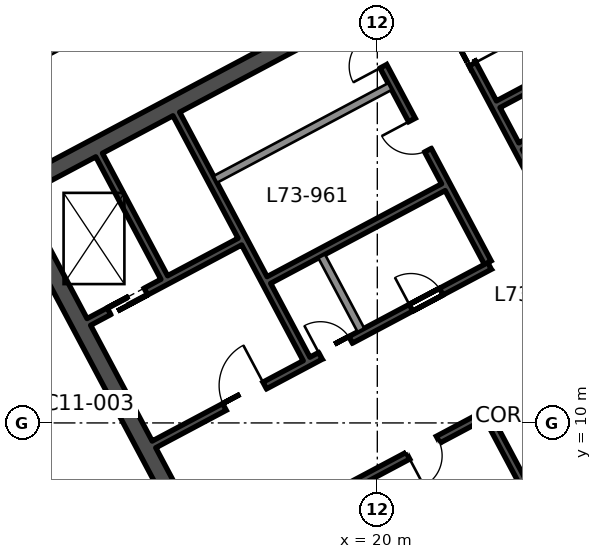
"""IFC4 building model, lengths in metres.
Left out: names, types, materials, properties, quantities, classifications, styles, units other than length and angle.
Written with IfcOpenShell. Run it as: python <this file> out.ifc"""

import sys

from ifc_helpers import new_model, si_unit, direction, frame, frame_2d, origin, place, context, subcontext, project, spatial, rectangle, extrude, element, fill, save


model = new_model("IFC4")
c1 = context("Model", 3, precision=1e-05, world=origin(), true_north=direction((0.0, 1.0)))
c2 = subcontext(c1, "Body", "Model", "MODEL_VIEW")
j1 = project(units=[si_unit("LENGTHUNIT", "METRE"), si_unit("PLANEANGLEUNIT", "RADIAN")], contexts=[c1])
p1 = place(None, origin())
s1 = spatial("IfcSite", under=j1, at=p1, CompositionType="ELEMENT")
p2 = place(p1, origin())
s2 = spatial("IfcBuilding", under=s1, at=p2, CompositionType="ELEMENT")
p3 = place(p2, frame((0.0, 0.0, 320.4)))
s3 = spatial("IfcBuildingStorey", under=s2, at=p3, CompositionType="ELEMENT", Elevation=320.4)
p4 = place(p3, frame((19.207, -0.604, 0.0), z_axis=(0.0, 0.0, 1.0), x_axis=(-0.469467968382, 0.882949504028, 0.0)))
e1 = element("IfcWall", 1, at=p4, inside=s3, PredefinedType="SHEAR", context=c2, shape_type="SweptSolid", body=[
    extrude(rectangle(XDim=19.1, YDim=0.45, at=frame_2d((9.55, 0.0))), origin(), (0.0, 0.0, 1.0), 3.9),
])
p5 = place(p4, frame((6.55, 0.0, 0.0)))
e2 = element("IfcOpeningElement", 2, at=p5, cuts=e1, PredefinedType="OPENING", context=c2, shape_type="SweptSolid", body=[
    extrude(rectangle(XDim=2.4, YDim=2.4, at=frame_2d((1.2, 1.2))), frame((0.0, 0.235, 0.0), z_axis=(0.0, -1.0, 0.0), x_axis=(1.0, 0.0, 0.0)), (0.0, 0.0, 1.0), 0.47),
])
p6 = place(p3, frame((19.3, -0.299, 0.0), z_axis=(0.0, 0.0, 1.0), x_axis=(0.88295276571, 0.46946183394, 0.0)))
e3 = element("IfcWall", 3, at=p6, inside=s3, PredefinedType="SHEAR", context=c2, shape_type="SweptSolid", body=[
    extrude(rectangle(XDim=20.2, YDim=0.45, at=frame_2d((10.1, 0.0))), origin(), (0.0, 0.0, 1.0), 3.9),
])
p7 = place(p3, frame((10.544, 16.167, 0.0), z_axis=(0.0, 0.0, 1.0), x_axis=(0.882947755831, 0.46947125628, 0.0)))
e4 = element("IfcWall", 4, at=p7, inside=s3, PredefinedType="SHEAR", context=c2, shape_type="SweptSolid", body=[
    extrude(rectangle(XDim=20.2, YDim=0.45, at=frame_2d((10.1, 0.0))), origin(), (0.0, 0.0, 1.0), 3.9),
])
p8 = place(p3, frame((14.394, 13.826, 0.0), z_axis=(0.0, 0.0, 1.0), x_axis=(-0.469494272526, 0.882935517501, 0.0)))
e5 = element("IfcWall", 5, at=p8, inside=s3, PredefinedType="SHEAR", context=c2, shape_type="SweptSolid", body=[
    extrude(rectangle(XDim=3.65, YDim=0.2, at=frame_2d((1.825, 0.0))), origin(), (0.0, 0.0, 1.0), 3.9),
])
p9 = place(p3, frame((18.138, 11.683, 0.0), z_axis=(0.0, 0.0, 1.0), x_axis=(-0.469480409012, 0.88294288918, 0.0)))
e6 = element("IfcWall", 6, at=p9, inside=s3, PredefinedType="SHEAR", context=c2, shape_type="SweptSolid", body=[
    extrude(rectangle(XDim=7.3, YDim=0.2, at=frame_2d((3.65, 0.0))), origin(), (0.0, 0.0, 1.0), 3.9),
])
p10 = place(p3, frame((19.569, 12.444, 0.0), z_axis=(0.0, 0.0, 1.0), x_axis=(-0.4694473164, 0.882960484464, 0.0)))
e7 = element("IfcWall", 7, at=p10, inside=s3, PredefinedType="SOLIDWALL", context=c2, shape_type="SweptSolid", body=[
    extrude(rectangle(XDim=2.2, YDim=0.2, at=frame_2d((1.1, 0.0))), origin(), (0.0, 0.0, 1.0), 3.9),
])
p11 = place(p3, frame((26.346, 3.702, 0.0), z_axis=(0.0, 0.0, 1.0), x_axis=(-0.469480409012, 0.88294288918, 0.0)))
e8 = element("IfcWall", 8, at=p11, inside=s3, PredefinedType="SHEAR", context=c2, shape_type="SweptSolid", body=[
    extrude(rectangle(XDim=7.3, YDim=0.2, at=frame_2d((3.65, 0.0))), origin(), (0.0, 0.0, 1.0), 3.9),
])
p12 = place(p11, frame((1.3, 0.0, 0.0)))
e9 = element("IfcOpeningElement", 9, at=p12, cuts=e8, PredefinedType="OPENING", context=c2, shape_type="SweptSolid", body=[
    extrude(rectangle(XDim=1.2, YDim=2.1, at=frame_2d((0.6, 1.05))), frame((0.0, 0.11, 0.0), z_axis=(0.0, -1.0, 0.0), x_axis=(1.0, 0.0, 0.0)), (0.0, 0.0, 1.0), 0.22),
])
p13 = place(p3, frame((22.906, 14.218, 0.0), z_axis=(0.0, 0.0, 1.0), x_axis=(-0.469480409012, 0.88294288918, 0.0)))
e10 = element("IfcWall", 10, at=p13, inside=s3, PredefinedType="SHEAR", context=c2, shape_type="SweptSolid", body=[
    extrude(rectangle(XDim=7.3, YDim=0.2, at=frame_2d((3.65, 0.0))), origin(), (0.0, 0.0, 1.0), 3.9),
])
p14 = place(p13, frame((3.35, 0.0, 0.0)))
e11 = element("IfcOpeningElement", 11, at=p14, cuts=e10, PredefinedType="OPENING", context=c2, shape_type="SweptSolid", body=[
    extrude(rectangle(XDim=0.9, YDim=2.1, at=frame_2d((0.45, 1.05))), frame((0.0, 0.11, 0.0), z_axis=(0.0, -1.0, 0.0), x_axis=(1.0, 0.0, 0.0)), (0.0, 0.0, 1.0), 0.22),
])
p15 = place(p13, frame((5.85, 0.0, 0.0)))
e12 = element("IfcOpeningElement", 12, at=p15, cuts=e10, PredefinedType="OPENING", context=c2, shape_type="SweptSolid", body=[
    extrude(rectangle(XDim=0.9, YDim=2.1, at=frame_2d((0.45, 1.05))), frame((0.0, 0.11, 0.0), z_axis=(0.0, -1.0, 0.0), x_axis=(1.0, 0.0, 0.0)), (0.0, 0.0, 1.0), 0.22),
])
p16 = place(p3, frame((24.76, 15.204, 0.0), z_axis=(0.0, 0.0, 1.0), x_axis=(-0.469494272526, 0.882935517501, 0.0)))
e13 = element("IfcWall", 13, at=p16, inside=s3, PredefinedType="SHEAR", context=c2, shape_type="SweptSolid", body=[
    extrude(rectangle(XDim=7.3, YDim=0.2, at=frame_2d((3.65, 0.0))), origin(), (0.0, 0.0, 1.0), 3.9),
])
p17 = place(p16, frame((4.8, 0.0, 0.0)))
e14 = element("IfcOpeningElement", 14, at=p17, cuts=e13, PredefinedType="OPENING", context=c2, shape_type="SweptSolid", body=[
    extrude(rectangle(XDim=1.2, YDim=2.1, at=frame_2d((0.6, 1.05))), frame((0.0, 0.11, 0.0), z_axis=(0.0, -1.0, 0.0), x_axis=(1.0, 0.0, 0.0)), (0.0, 0.0, 1.0), 0.22),
])
p18 = place(p3, frame((18.104, 7.701, 0.0), z_axis=(0.0, 0.0, 1.0), x_axis=(0.882952937579, 0.469461510692, 0.0)))
e15 = element("IfcWall", 15, at=p18, inside=s3, PredefinedType="SHEAR", context=c2, shape_type="SweptSolid", body=[
    extrude(rectangle(XDim=5.4, YDim=0.2, at=frame_2d((2.7, 0.0))), origin(), (0.0, 0.0, 1.0), 3.9),
])
p19 = place(p18, frame((0.36, 0.0, 0.0)))
e16 = element("IfcOpeningElement", 16, at=p19, cuts=e15, PredefinedType="OPENING", context=c2, shape_type="SweptSolid", body=[
    extrude(rectangle(XDim=0.9, YDim=2.1, at=frame_2d((0.45, 1.05))), frame((0.0, 0.11, 0.0), z_axis=(0.0, -1.0, 0.0), x_axis=(1.0, 0.0, 0.0)), (0.0, 0.0, 1.0), 0.22),
])
p20 = place(p18, frame((3.06, 0.0, 0.0)))
e17 = element("IfcOpeningElement", 17, at=p20, cuts=e15, PredefinedType="OPENING", context=c2, shape_type="SweptSolid", body=[
    extrude(rectangle(XDim=0.9, YDim=2.1, at=frame_2d((0.45, 1.05))), frame((0.0, 0.11, 0.0), z_axis=(0.0, -1.0, 0.0), x_axis=(1.0, 0.0, 0.0)), (0.0, 0.0, 1.0), 0.22),
])
p21 = place(p3, frame((14.124, 9.435, 0.0), z_axis=(0.0, 0.0, 1.0), x_axis=(0.882940221191, 0.469485426614, 0.0)))
e18 = element("IfcWall", 18, at=p21, inside=s3, PredefinedType="SHEAR", context=c2, shape_type="SweptSolid", body=[
    extrude(rectangle(XDim=10.0, YDim=0.2, at=frame_2d((5.0, 0.0))), origin(), (0.0, 0.0, 1.0), 3.9),
])
p22 = place(p21, frame((2.1, 0.0, 0.0)))
e19 = element("IfcOpeningElement", 19, at=p22, cuts=e18, PredefinedType="OPENING", context=c2, shape_type="SweptSolid", body=[
    extrude(rectangle(XDim=1.2, YDim=2.1, at=frame_2d((0.6, 1.05))), frame((0.0, 0.11, 0.0), z_axis=(0.0, -1.0, 0.0), x_axis=(1.0, 0.0, 0.0)), (0.0, 0.0, 1.0), 0.22),
])
p23 = place(p21, frame((4.96, 0.0, 0.0)))
e20 = element("IfcOpeningElement", 20, at=p23, cuts=e18, PredefinedType="OPENING", context=c2, shape_type="SweptSolid", body=[
    extrude(rectangle(XDim=0.9, YDim=2.1, at=frame_2d((0.45, 1.05))), frame((0.0, 0.11, 0.0), z_axis=(0.0, -1.0, 0.0), x_axis=(1.0, 0.0, 0.0)), (0.0, 0.0, 1.0), 0.22),
])
p24 = place(p21, frame((7.66, 0.0, 0.0)))
e21 = element("IfcOpeningElement", 21, at=p24, cuts=e18, PredefinedType="OPENING", context=c2, shape_type="SweptSolid", body=[
    extrude(rectangle(XDim=0.9, YDim=2.1, at=frame_2d((0.45, 1.05))), frame((0.0, 0.11, 0.0), z_axis=(0.0, -1.0, 0.0), x_axis=(1.0, 0.0, 0.0)), (0.0, 0.0, 1.0), 0.22),
])
p25 = place(p3, frame((17.147, 13.761, 0.0), z_axis=(0.0, 0.0, 1.0), x_axis=(0.882964314875, 0.469440111896, 0.0)))
e22 = element("IfcWall", 22, at=p25, inside=s3, PredefinedType="SHEAR", context=c2, shape_type="SweptSolid", body=[
    extrude(rectangle(XDim=5.2, YDim=0.2, at=frame_2d((2.6, 0.0))), origin(), (0.0, 0.0, 1.0), 3.9),
])
p26 = place(p3, frame((23.769, 17.282, 0.0), z_axis=(0.0, 0.0, 1.0), x_axis=(0.882940221191, 0.469485426614, 0.0)))
e23 = element("IfcWall", 23, at=p26, inside=s3, PredefinedType="SHEAR", context=c2, shape_type="SweptSolid", body=[
    extrude(rectangle(XDim=8.0, YDim=0.2, at=frame_2d((4.0, 0.0))), origin(), (0.0, 0.0, 1.0), 3.9),
])
p27 = place(p3, frame((12.41, 12.658, 0.0), z_axis=(0.0, 0.0, 1.0), x_axis=(0.8829484765, 0.469469900894, 0.0)))
e24 = element("IfcWall", 24, at=p27, inside=s3, PredefinedType="SHEAR", context=c2, shape_type="SweptSolid", body=[
    extrude(rectangle(XDim=4.5, YDim=0.2, at=frame_2d((2.25, 0.0))), origin(), (0.0, 0.0, 1.0), 3.9),
])
p28 = place(p27, frame((0.6, 0.0, 0.0)))
e25 = element("IfcOpeningElement", 25, at=p28, cuts=e24, PredefinedType="OPENING", context=c2, shape_type="SweptSolid", body=[
    extrude(rectangle(XDim=1.1, YDim=2.1, at=frame_2d((0.55, 1.05))), frame((0.0, 0.11, 0.0), z_axis=(0.0, -1.0, 0.0), x_axis=(1.0, 0.0, 0.0)), (0.0, 0.0, 1.0), 0.22),
])
p29 = place(p3, frame((23.182, 18.385, 0.0), z_axis=(0.0, 0.0, 1.0), x_axis=(0.88295287151, 0.469461634952, 0.0)))
e26 = element("IfcWall", 26, at=p29, inside=s3, PredefinedType="SHEAR", context=c2, shape_type="SweptSolid", body=[
    extrude(rectangle(XDim=8.0, YDim=0.2, at=frame_2d((4.0, 0.0))), origin(), (0.0, 0.0, 1.0), 3.9),
])
p30 = place(p3, frame((15.739, 16.409, 0.0), z_axis=(0.0, 0.0, 1.0), x_axis=(0.882934506056, 0.469496174655, 0.0)))
e27 = element("IfcWall", 27, at=p30, inside=s3, PredefinedType="SOLIDWALL", context=c2, shape_type="SweptSolid", body=[
    extrude(rectangle(XDim=5.2, YDim=0.2, at=frame_2d((2.6, 0.0))), origin(), (0.0, 0.0, 1.0), 3.9),
])
p31 = place(p3, frame((0.0, 13.704, 0.0), z_axis=(0.0, 0.0, 1.0), x_axis=(0.882954463269, 0.469458641196, 0.0)))
e28 = element("IfcWall", 28, at=p31, inside=s3, PredefinedType="PARTITIONING", context=c2, shape_type="SweptSolid", body=[
    extrude(rectangle(XDim=33.766, YDim=0.15, at=frame_2d((16.883, 0.0))), origin(), (0.0, 0.0, 1.0), 3.54),
])
p32 = place(p31, frame((15.95, 0.0, 0.0)))
e29 = element("IfcOpeningElement", 29, at=p32, cuts=e28, PredefinedType="OPENING", context=c2, shape_type="SweptSolid", body=[
    extrude(rectangle(XDim=1.8, YDim=2.1, at=frame_2d((0.9, 1.05))), frame((0.0, 0.085, 0.0), z_axis=(0.0, -1.0, 0.0), x_axis=(1.0, 0.0, 0.0)), (0.0, 0.0, 1.0), 0.17),
])
p33 = place(p22, origin())
e30 = element("IfcDoor", 30, at=p33, inside=s3, OperationType="SINGLE_SWING_RIGHT", PredefinedType="DOOR", context=c2, shape_type="SweptSolid", body=[
    extrude(rectangle(XDim=1.2, YDim=2.1, at=frame_2d((0.6, 1.05))), frame((0.0, 0.025, 0.0), z_axis=(0.0, -1.0, 0.0), x_axis=(1.0, 0.0, 0.0)), (0.0, 0.0, 1.0), 0.05),
])
fill(e19, e30)
p34 = place(p17, frame((1.2, 0.0, 0.0), z_axis=(0.0, 0.0, 1.0), x_axis=(-1.0, 0.0, 0.0)))
e31 = element("IfcDoor", 31, at=p34, inside=s3, OperationType="SINGLE_SWING_RIGHT", PredefinedType="DOOR", context=c2, shape_type="SweptSolid", body=[
    extrude(rectangle(XDim=1.2, YDim=2.1, at=frame_2d((0.6, 1.05))), frame((0.0, 0.025, 0.0), z_axis=(0.0, -1.0, 0.0), x_axis=(1.0, 0.0, 0.0)), (0.0, 0.0, 1.0), 0.05),
])
fill(e14, e31)
p35 = place(p23, origin())
e32 = element("IfcDoor", 32, at=p35, inside=s3, OperationType="SINGLE_SWING_LEFT", PredefinedType="DOOR", context=c2, shape_type="SweptSolid", body=[
    extrude(rectangle(XDim=0.9, YDim=2.1, at=frame_2d((0.45, 1.05))), frame((0.0, 0.025, 0.0), z_axis=(0.0, -1.0, 0.0), x_axis=(1.0, 0.0, 0.0)), (0.0, 0.0, 1.0), 0.05),
])
fill(e20, e32)
p36 = place(p24, origin())
e33 = element("IfcDoor", 33, at=p36, inside=s3, OperationType="SINGLE_SWING_LEFT", PredefinedType="DOOR", context=c2, shape_type="SweptSolid", body=[
    extrude(rectangle(XDim=0.9, YDim=2.1, at=frame_2d((0.45, 1.05))), frame((0.0, 0.025, 0.0), z_axis=(0.0, -1.0, 0.0), x_axis=(1.0, 0.0, 0.0)), (0.0, 0.0, 1.0), 0.05),
])
fill(e21, e33)
p37 = place(p20, frame((0.9, 0.0, 0.0), z_axis=(0.0, 0.0, 1.0), x_axis=(-1.0, 0.0, 0.0)))
e34 = element("IfcDoor", 34, at=p37, inside=s3, OperationType="SINGLE_SWING_RIGHT", PredefinedType="DOOR", context=c2, shape_type="SweptSolid", body=[
    extrude(rectangle(XDim=0.9, YDim=2.1, at=frame_2d((0.45, 1.05))), frame((0.0, 0.025, 0.0), z_axis=(0.0, -1.0, 0.0), x_axis=(1.0, 0.0, 0.0)), (0.0, 0.0, 1.0), 0.05),
])
fill(e17, e34)
p38 = place(p28, origin())
e35 = element("IfcDoor", 35, at=p38, inside=s3, OperationType="DOUBLE_DOOR_SLIDING", PredefinedType="DOOR", context=c2, shape_type="SweptSolid", body=[
    extrude(rectangle(XDim=1.1, YDim=2.1, at=frame_2d((0.55, 1.05))), frame((0.0, 0.025, 0.0), z_axis=(0.0, -1.0, 0.0), x_axis=(1.0, 0.0, 0.0)), (0.0, 0.0, 1.0), 0.05),
])
fill(e25, e35)
p39 = place(p14, origin())
e36 = element("IfcDoor", 36, at=p39, inside=s3, OperationType="SINGLE_SWING_RIGHT", PredefinedType="DOOR", context=c2, shape_type="SweptSolid", body=[
    extrude(rectangle(XDim=0.9, YDim=2.1, at=frame_2d((0.45, 1.05))), frame((0.0, 0.025, 0.0), z_axis=(0.0, -1.0, 0.0), x_axis=(1.0, 0.0, 0.0)), (0.0, 0.0, 1.0), 0.05),
])
fill(e11, e36)
p40 = place(p15, origin())
e37 = element("IfcDoor", 37, at=p40, inside=s3, OperationType="SINGLE_SWING_LEFT", PredefinedType="DOOR", context=c2, shape_type="SweptSolid", body=[
    extrude(rectangle(XDim=0.9, YDim=2.1, at=frame_2d((0.45, 1.05))), frame((0.0, 0.025, 0.0), z_axis=(0.0, -1.0, 0.0), x_axis=(1.0, 0.0, 0.0)), (0.0, 0.0, 1.0), 0.05),
])
fill(e12, e37)
save(model, sys.argv[1])
